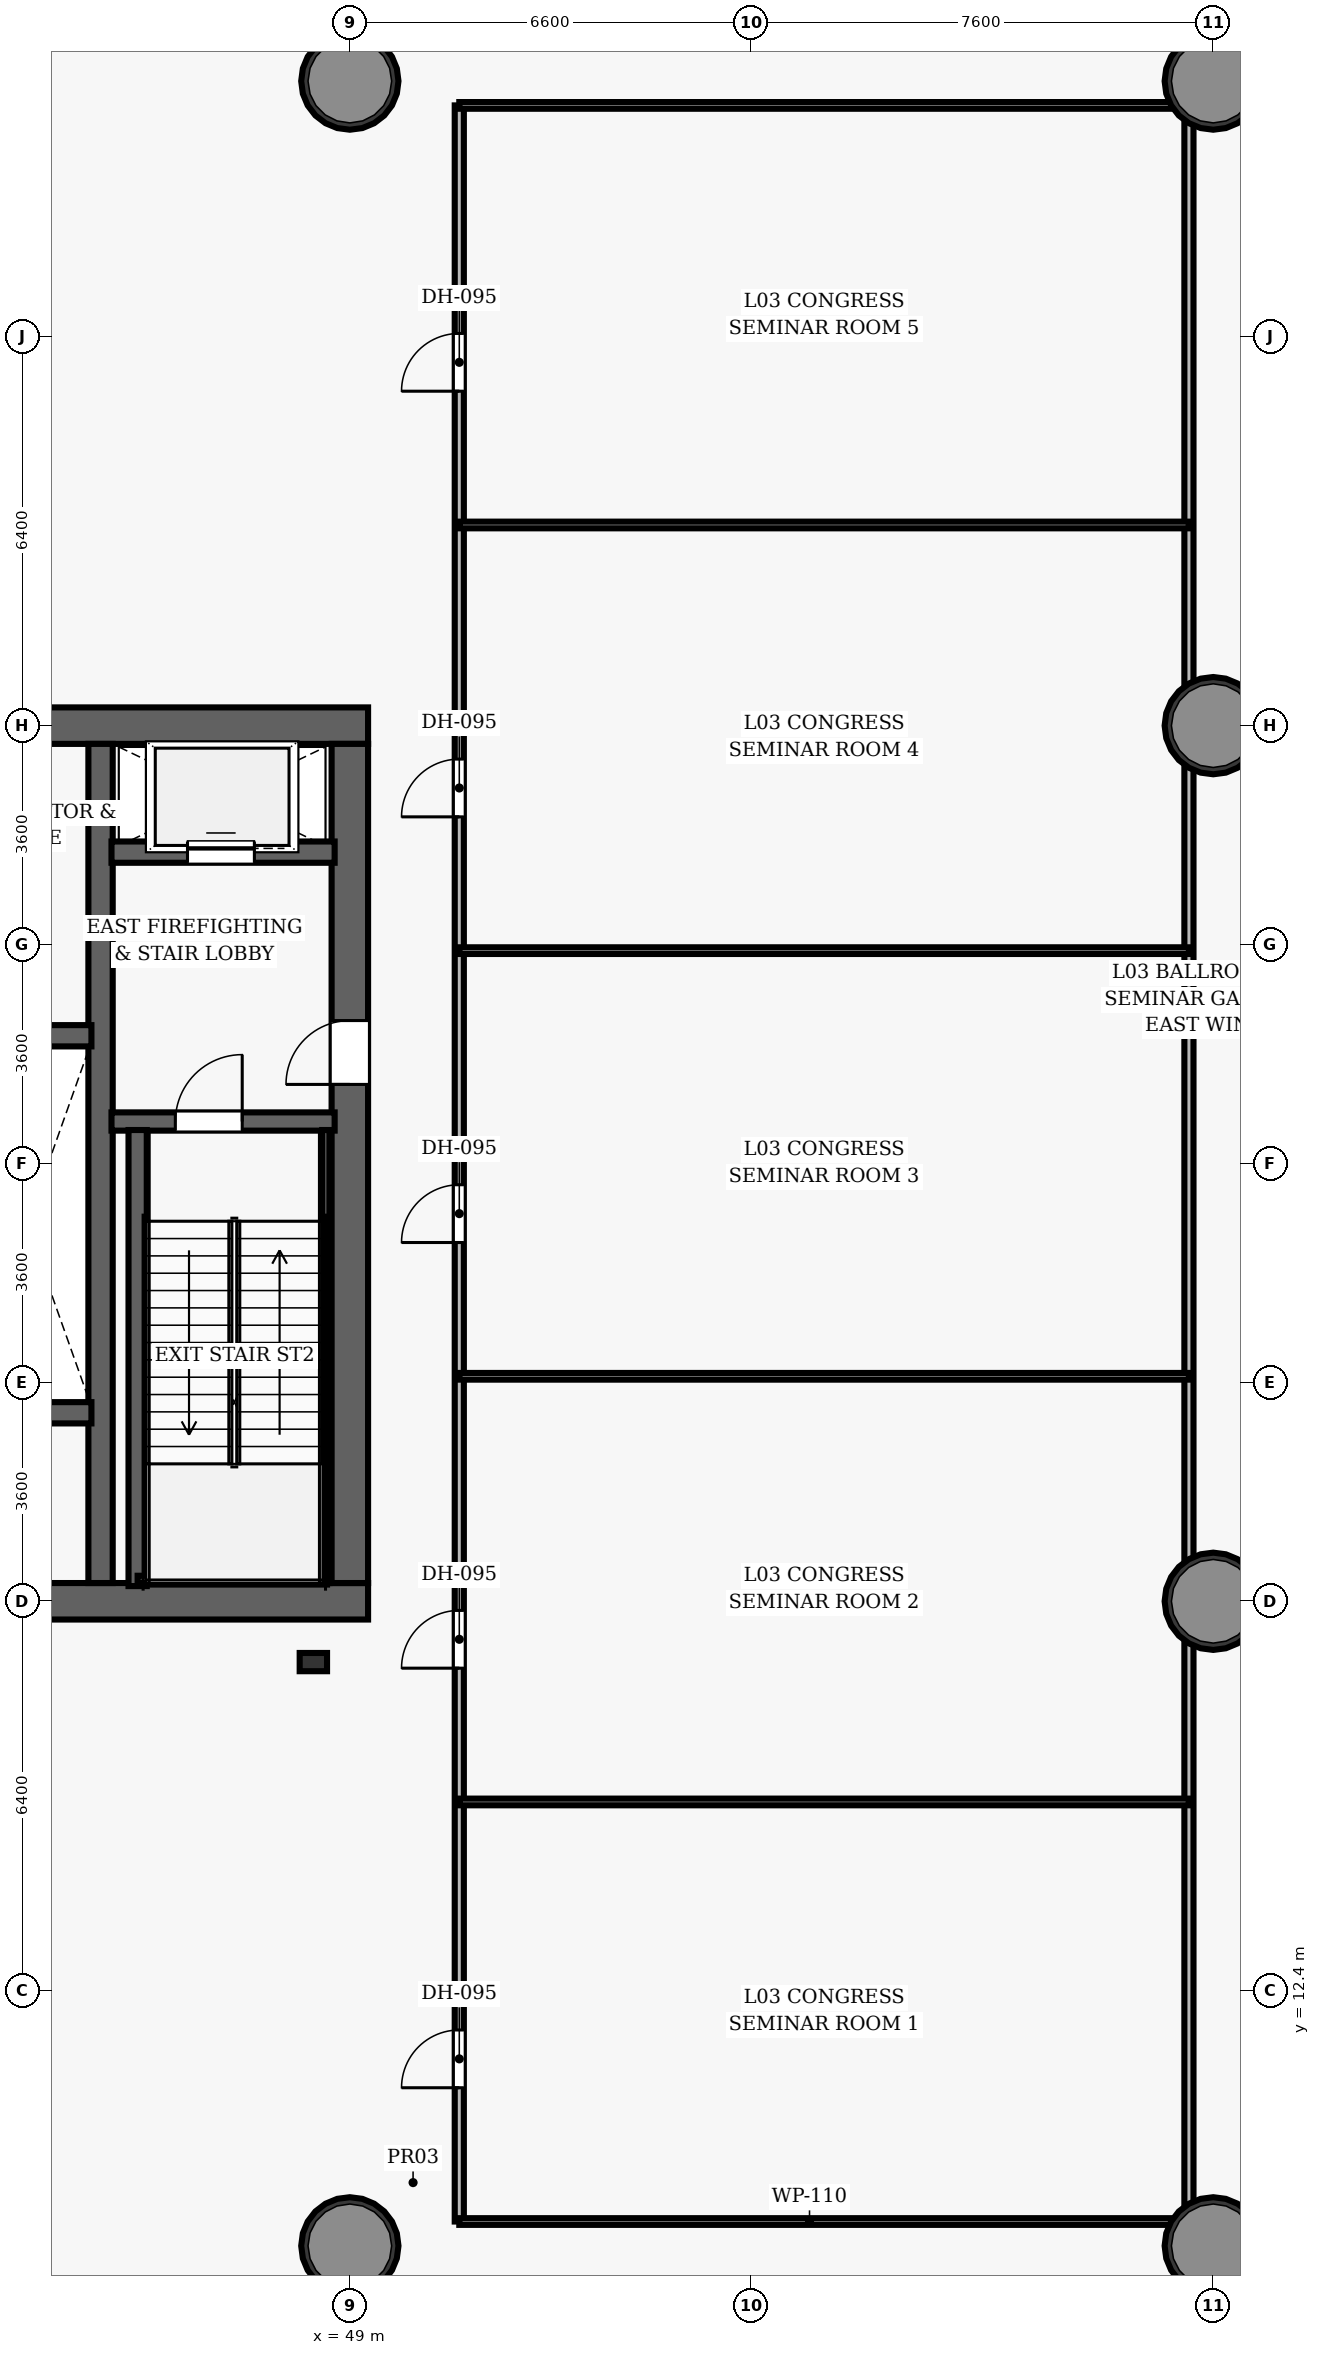
"""IFC4 building model, lengths in metres.
Left out: names, types, materials, properties, quantities, classifications, styles, units other than length and angle.
Written with IfcOpenShell. Run it as: python <this file> out.ifc"""

import sys

from ifc_helpers import new_model, si_unit, direction, frame, frame_2d, origin, origin_2d, place, context, subcontext, project, spatial, rectangle, hollow_circle, extrude, element, fill, save


model = new_model("IFC4")
c1 = context("Model", 3, precision=1e-05, world=origin(), true_north=direction((0.0, 1.0)))
c2 = subcontext(c1, "Body", "Model", "MODEL_VIEW")
j1 = project(units=[si_unit("LENGTHUNIT", "METRE"), si_unit("PLANEANGLEUNIT", "RADIAN")], contexts=[c1])
p1 = place(None, origin())
s1 = spatial("IfcSite", under=j1, at=p1, CompositionType="ELEMENT")
p2 = place(p1, origin())
s2 = spatial("IfcBuilding", under=s1, at=p2, CompositionType="ELEMENT")
p3 = place(p2, frame((0.0, 0.0, 18.6)))
s3 = spatial("IfcBuildingStorey", under=s2, at=p3, CompositionType="ELEMENT", Elevation=18.6)
p4 = place(p3, frame((26.7, 18.8, 0.0), z_axis=(0.0, 0.0, 1.0), x_axis=(1.0, 0.0, 0.0)))
e1 = element("IfcWall", 1, at=p4, inside=s3, PredefinedType="SHEAR", context=c2, shape_type="SweptSolid", body=[
    extrude(rectangle(XDim=22.6, YDim=0.6, at=frame_2d((11.3, 0.0))), origin(), (0.0, 0.0, 1.0), 5.4),
])
p5 = place(p4, frame((14.52, 0.0, 0.0)))
e2 = element("IfcOpeningElement", 2, at=p5, cuts=e1, PredefinedType="OPENING", context=c2, shape_type="SweptSolid", body=[
    extrude(rectangle(XDim=1.05, YDim=2.15, at=frame_2d((0.525, 1.075))), frame((0.0, 0.31, 0.0), z_axis=(0.0, -1.0, 0.0), x_axis=(1.0, 0.0, 0.0)), (0.0, 0.0, 1.0), 0.62),
])
p6 = place(p3, frame((26.7, 33.2, 0.0), z_axis=(0.0, 0.0, 1.0), x_axis=(1.0, 0.0, 0.0)))
e3 = element("IfcWall", 3, at=p6, inside=s3, PredefinedType="SHEAR", context=c2, shape_type="SweptSolid", body=[
    extrude(rectangle(XDim=22.6, YDim=0.6, at=frame_2d((11.3, 0.0))), origin(), (0.0, 0.0, 1.0), 5.4),
])
p7 = place(p6, frame((4.62, 0.0, 0.0)))
e4 = element("IfcOpeningElement", 4, at=p7, cuts=e3, PredefinedType="OPENING", context=c2, shape_type="SweptSolid", body=[
    extrude(rectangle(XDim=1.05, YDim=2.15, at=frame_2d((0.525, 1.075))), frame((0.0, 0.31, 0.0), z_axis=(0.0, -1.0, 0.0), x_axis=(1.0, 0.0, 0.0)), (0.0, 0.0, 1.0), 0.62),
])
p8 = place(p6, frame((14.52, 0.0, 0.0)))
e5 = element("IfcOpeningElement", 5, at=p8, cuts=e3, PredefinedType="OPENING", context=c2, shape_type="SweptSolid", body=[
    extrude(rectangle(XDim=1.05, YDim=2.15, at=frame_2d((0.525, 1.075))), frame((0.0, 0.31, 0.0), z_axis=(0.0, -1.0, 0.0), x_axis=(1.0, 0.0, 0.0)), (0.0, 0.0, 1.0), 0.62),
])
p9 = place(p3, frame((49.0, 19.1, 0.0), z_axis=(0.0, 0.0, 1.0), x_axis=(0.0, 1.0, 0.0)))
e6 = element("IfcWall", 6, at=p9, inside=s3, PredefinedType="SHEAR", context=c2, shape_type="SweptSolid", body=[
    extrude(rectangle(XDim=13.8, YDim=0.6, at=frame_2d((6.9, 0.0))), origin(), (0.0, 0.0, 1.0), 5.4),
])
p10 = place(p9, frame((8.2, 0.0, 0.0)))
e7 = element("IfcOpeningElement", 7, at=p10, cuts=e6, PredefinedType="OPENING", context=c2, shape_type="SweptSolid", body=[
    extrude(rectangle(XDim=1.05, YDim=2.15, at=frame_2d((0.525, 1.075))), frame((0.0, 0.31, 0.0), z_axis=(0.0, -1.0, 0.0), x_axis=(1.0, 0.0, 0.0)), (0.0, 0.0, 1.0), 0.62),
])
p11 = place(p3, frame((44.9, 19.1, 0.0), z_axis=(0.0, 0.0, 1.0), x_axis=(0.0, 1.0, 0.0)))
e8 = element("IfcWall", 8, at=p11, inside=s3, PredefinedType="SHEAR", context=c2, shape_type="SweptSolid", body=[
    extrude(rectangle(XDim=13.8, YDim=0.4, at=frame_2d((6.9, 0.0))), origin(), (0.0, 0.0, 1.0), 5.4),
])
for number, where, z_axis, x_axis in (
    (9, (49.0, 8.2, 0.0), (0.0, 0.0, 1.0), (1.0, 0.0, 0.0)),
    (10, (63.2, 8.2, 0.0), (0.0, 0.0, 1.0), (1.0, 0.0, 0.0)),
    (11, (63.2, 18.8, 0.0), (0.0, 0.0, 1.0), (1.0, 0.0, 0.0)),
    (12, (63.2, 33.2, 0.0), (0.0, 0.0, 1.0), (1.0, 0.0, 0.0)),
    (13, (49.0, 43.8, 0.0), (0.0, 0.0, 1.0), (1.0, 0.0, 0.0)),
    (14, (63.2, 43.8, 0.0), (0.0, 0.0, 1.0), (1.0, 0.0, 0.0)),
):
    element("IfcColumn", number, at=place(p3, frame(where, z_axis=z_axis, x_axis=x_axis)), inside=s3, PredefinedType="COLUMN", context=c2, shape_type="SweptSolid", body=[
        extrude(hollow_circle(Radius=0.8, WallThickness=0.06, at=origin_2d()), origin(), (0.0, 0.0, 1.0), 5.4),
    ])
p12 = place(p3, frame((45.08, 26.69, 0.0), z_axis=(0.0, 0.0, 1.0), x_axis=(1.0, 0.0, 0.0)))
e15 = element("IfcWall", 15, at=p12, inside=s3, PredefinedType="SHEAR", context=c2, shape_type="SweptSolid", body=[
    extrude(rectangle(XDim=3.67, YDim=0.3, at=frame_2d((1.835, 0.0))), origin(), (0.0, 0.0, 1.0), 5.4),
])
p13 = place(p12, frame((1.05, 0.0, 0.0)))
e16 = element("IfcOpeningElement", 16, at=p13, cuts=e15, PredefinedType="OPENING", context=c2, shape_type="SweptSolid", body=[
    extrude(rectangle(XDim=1.1, YDim=2.15, at=frame_2d((0.55, 1.075))), frame((0.0, 0.16, 0.0), z_axis=(0.0, -1.0, 0.0), x_axis=(1.0, 0.0, 0.0)), (0.0, 0.0, 1.0), 0.32),
])
p14 = place(p3, frame((45.51, 19.05, 0.0), z_axis=(0.0, 0.0, 1.0), x_axis=(0.0, 1.0, 0.0)))
e17 = element("IfcWall", 17, at=p14, inside=s3, PredefinedType="SHEAR", context=c2, shape_type="SweptSolid", body=[
    extrude(rectangle(XDim=7.5, YDim=0.3, at=frame_2d((3.75, 0.0))), origin(), (0.0, 0.0, 1.0), 5.4),
])
p15 = place(p3, frame((48.605, 19.1, 0.0), z_axis=(0.0, 0.0, 1.0), x_axis=(0.0, 1.0, 0.0)))
e18 = element("IfcWall", 18, at=p15, inside=s3, PredefinedType="SHEAR", context=c2, shape_type="SweptSolid", body=[
    extrude(rectangle(XDim=7.45, YDim=0.12, at=frame_2d((3.725, 0.0))), origin(), (0.0, 0.0, 1.0), 5.4),
])
p16 = place(p3, frame((45.51, 19.16, 0.0), z_axis=(0.0, 0.0, 1.0), x_axis=(1.0, 0.0, 0.0)))
e19 = element("IfcWall", 19, at=p16, inside=s3, PredefinedType="SHEAR", context=c2, shape_type="SweptSolid", body=[
    extrude(rectangle(XDim=3.095, YDim=0.12, at=frame_2d((1.547, 0.0))), origin(), (0.0, 0.0, 1.0), 5.4),
])
p17 = place(p3, frame((45.08, 31.12, 0.0), z_axis=(0.0, 0.0, 1.0), x_axis=(1.0, 0.0, 0.0)))
e20 = element("IfcWall", 20, at=p17, inside=s3, PredefinedType="SHEAR", context=c2, shape_type="SweptSolid", body=[
    extrude(rectangle(XDim=3.67, YDim=0.35, at=frame_2d((1.835, 0.0))), origin(), (0.0, 0.0, 1.0), 4.11),
])
p18 = place(p17, frame((1.25, 0.0, 0.0)))
e21 = element("IfcOpeningElement", 21, at=p18, cuts=e20, PredefinedType="OPENING", context=c2, shape_type="SweptSolid", body=[
    extrude(rectangle(XDim=1.1, YDim=2.15, at=frame_2d((0.55, 1.075))), frame((0.0, 0.185, 0.0), z_axis=(0.0, -1.0, 0.0), x_axis=(1.0, 0.0, 0.0)), (0.0, 0.0, 1.0), 0.37),
])
for number, where, z_axis, x_axis in (
    (22, (42.72, 21.9, 0.0), (0.0, 0.0, 1.0), (1.0, 0.0, 0.0)),
    (23, (42.72, 28.1, 0.0), (0.0, 0.0, 1.0), (1.0, 0.0, 0.0)),
):
    element("IfcWall", number, at=place(p3, frame(where, z_axis=z_axis, x_axis=x_axis)), inside=s3, PredefinedType="SHEAR", context=c2, shape_type="SweptSolid", body=[
        extrude(rectangle(XDim=2.03, YDim=0.35, at=frame_2d((1.015, 0.0))), origin(), (0.0, 0.0, 1.0), 4.11),
    ])
p19 = place(p3, frame((48.4, 17.8, 0.0), z_axis=(0.0, 0.0, 1.0), x_axis=(1.0, 0.0, 0.0)))
e24 = element("IfcColumn", 24, at=p19, inside=s3, PredefinedType="PILASTER", context=c2, shape_type="SweptSolid", body=[
    extrude(rectangle(XDim=0.45, YDim=0.3, at=origin_2d()), origin(), (0.0, 0.0, 1.0), 5.4),
])
p20 = place(p3, frame((50.8, 8.6, 0.0), z_axis=(0.0, 0.0, 1.0), x_axis=(0.0, 1.0, 0.0)))
e25 = element("IfcWall", 25, at=p20, inside=s3, PredefinedType="PARTITIONING", context=c2, shape_type="SweptSolid", body=[
    extrude(rectangle(XDim=34.8, YDim=0.15, at=frame_2d((17.4, 0.0))), origin(), (0.0, 0.0, 1.0), 4.11),
])
p21 = place(p20, frame((2.2, 0.0, 0.0)))
e26 = element("IfcOpeningElement", 26, at=p21, cuts=e25, PredefinedType="OPENING", context=c2, shape_type="SweptSolid", body=[
    extrude(rectangle(XDim=0.95, YDim=2.15, at=frame_2d((0.475, 1.075))), frame((0.0, 0.085, 0.0), z_axis=(0.0, -1.0, 0.0), x_axis=(1.0, 0.0, 0.0)), (0.0, 0.0, 1.0), 0.17),
])
p22 = place(p20, frame((9.1, 0.0, 0.0)))
e27 = element("IfcOpeningElement", 27, at=p22, cuts=e25, PredefinedType="OPENING", context=c2, shape_type="SweptSolid", body=[
    extrude(rectangle(XDim=0.95, YDim=2.15, at=frame_2d((0.475, 1.075))), frame((0.0, 0.085, 0.0), z_axis=(0.0, -1.0, 0.0), x_axis=(1.0, 0.0, 0.0)), (0.0, 0.0, 1.0), 0.17),
])
p23 = place(p20, frame((16.1, 0.0, 0.0)))
e28 = element("IfcOpeningElement", 28, at=p23, cuts=e25, PredefinedType="OPENING", context=c2, shape_type="SweptSolid", body=[
    extrude(rectangle(XDim=0.95, YDim=2.15, at=frame_2d((0.475, 1.075))), frame((0.0, 0.085, 0.0), z_axis=(0.0, -1.0, 0.0), x_axis=(1.0, 0.0, 0.0)), (0.0, 0.0, 1.0), 0.17),
])
p24 = place(p20, frame((23.1, 0.0, 0.0)))
e29 = element("IfcOpeningElement", 29, at=p24, cuts=e25, PredefinedType="OPENING", context=c2, shape_type="SweptSolid", body=[
    extrude(rectangle(XDim=0.95, YDim=2.15, at=frame_2d((0.475, 1.075))), frame((0.0, 0.085, 0.0), z_axis=(0.0, -1.0, 0.0), x_axis=(1.0, 0.0, 0.0)), (0.0, 0.0, 1.0), 0.17),
])
p25 = place(p20, frame((30.1, 0.0, 0.0)))
e30 = element("IfcOpeningElement", 30, at=p25, cuts=e25, PredefinedType="OPENING", context=c2, shape_type="SweptSolid", body=[
    extrude(rectangle(XDim=0.95, YDim=2.15, at=frame_2d((0.475, 1.075))), frame((0.0, 0.085, 0.0), z_axis=(0.0, -1.0, 0.0), x_axis=(1.0, 0.0, 0.0)), (0.0, 0.0, 1.0), 0.17),
])
p26 = place(p3, frame((62.8, 8.6, 0.0), z_axis=(0.0, 0.0, 1.0), x_axis=(0.0, 1.0, 0.0)))
e31 = element("IfcWall", 31, at=p26, inside=s3, PredefinedType="PARTITIONING", context=c2, shape_type="SweptSolid", body=[
    extrude(rectangle(XDim=34.8, YDim=0.15, at=frame_2d((17.4, 0.0))), origin(), (0.0, 0.0, 1.0), 4.11),
])
for number, where, z_axis, x_axis in (
    (32, (50.8, 8.6, 0.0), (0.0, 0.0, 1.0), (1.0, 0.0, 0.0)),
    (33, (50.8, 15.5, 0.0), (0.0, 0.0, 1.0), (1.0, 0.0, 0.0)),
    (34, (50.8, 22.5, 0.0), (0.0, 0.0, 1.0), (1.0, 0.0, 0.0)),
    (35, (50.8, 29.5, 0.0), (0.0, 0.0, 1.0), (1.0, 0.0, 0.0)),
    (36, (50.8, 36.5, 0.0), (0.0, 0.0, 1.0), (1.0, 0.0, 0.0)),
    (37, (50.8, 43.4, 0.0), (0.0, 0.0, 1.0), (1.0, 0.0, 0.0)),
):
    element("IfcWall", number, at=place(p3, frame(where, z_axis=z_axis, x_axis=x_axis)), inside=s3, PredefinedType="PARTITIONING", context=c2, shape_type="SweptSolid", body=[
        extrude(rectangle(XDim=12.0, YDim=0.11, at=frame_2d((6.0, 0.0))), origin(), (0.0, 0.0, 1.0), 4.11),
    ])
p27 = place(p13, origin())
e38 = element("IfcDoor", 38, at=p27, inside=s3, OperationType="SINGLE_SWING_RIGHT", PredefinedType="DOOR", context=c2, shape_type="SweptSolid", body=[
    extrude(rectangle(XDim=1.1, YDim=2.15, at=frame_2d((0.55, 1.075))), frame((0.0, 0.025, 0.0), z_axis=(0.0, -1.0, 0.0), x_axis=(1.0, 0.0, 0.0)), (0.0, 0.0, 1.0), 0.05),
])
fill(e16, e38)
p28 = place(p10, origin())
e39 = element("IfcDoor", 39, at=p28, inside=s3, OperationType="SINGLE_SWING_LEFT", PredefinedType="DOOR", context=c2, shape_type="SweptSolid", body=[
    extrude(rectangle(XDim=1.05, YDim=2.15, at=frame_2d((0.525, 1.075))), frame((0.0, 0.025, 0.0), z_axis=(0.0, -1.0, 0.0), x_axis=(1.0, 0.0, 0.0)), (0.0, 0.0, 1.0), 0.05),
])
fill(e7, e39)
p29 = place(p21, origin())
e40 = element("IfcDoor", 40, at=p29, inside=s3, OperationType="SINGLE_SWING_LEFT", PredefinedType="DOOR", context=c2, shape_type="SweptSolid", body=[
    extrude(rectangle(XDim=0.95, YDim=2.15, at=frame_2d((0.475, 1.075))), frame((0.0, 0.025, 0.0), z_axis=(0.0, -1.0, 0.0), x_axis=(1.0, 0.0, 0.0)), (0.0, 0.0, 1.0), 0.05),
])
fill(e26, e40)
p30 = place(p22, origin())
e41 = element("IfcDoor", 41, at=p30, inside=s3, OperationType="SINGLE_SWING_LEFT", PredefinedType="DOOR", context=c2, shape_type="SweptSolid", body=[
    extrude(rectangle(XDim=0.95, YDim=2.15, at=frame_2d((0.475, 1.075))), frame((0.0, 0.025, 0.0), z_axis=(0.0, -1.0, 0.0), x_axis=(1.0, 0.0, 0.0)), (0.0, 0.0, 1.0), 0.05),
])
fill(e27, e41)
p31 = place(p23, origin())
e42 = element("IfcDoor", 42, at=p31, inside=s3, OperationType="SINGLE_SWING_LEFT", PredefinedType="DOOR", context=c2, shape_type="SweptSolid", body=[
    extrude(rectangle(XDim=0.95, YDim=2.15, at=frame_2d((0.475, 1.075))), frame((0.0, 0.025, 0.0), z_axis=(0.0, -1.0, 0.0), x_axis=(1.0, 0.0, 0.0)), (0.0, 0.0, 1.0), 0.05),
])
fill(e28, e42)
p32 = place(p24, origin())
e43 = element("IfcDoor", 43, at=p32, inside=s3, OperationType="SINGLE_SWING_LEFT", PredefinedType="DOOR", context=c2, shape_type="SweptSolid", body=[
    extrude(rectangle(XDim=0.95, YDim=2.15, at=frame_2d((0.475, 1.075))), frame((0.0, 0.025, 0.0), z_axis=(0.0, -1.0, 0.0), x_axis=(1.0, 0.0, 0.0)), (0.0, 0.0, 1.0), 0.05),
])
fill(e29, e43)
p33 = place(p25, origin())
e44 = element("IfcDoor", 44, at=p33, inside=s3, OperationType="SINGLE_SWING_LEFT", PredefinedType="DOOR", context=c2, shape_type="SweptSolid", body=[
    extrude(rectangle(XDim=0.95, YDim=2.15, at=frame_2d((0.475, 1.075))), frame((0.0, 0.025, 0.0), z_axis=(0.0, -1.0, 0.0), x_axis=(1.0, 0.0, 0.0)), (0.0, 0.0, 1.0), 0.05),
])
fill(e30, e44)
p34 = place(p18, origin())
e45 = element("IfcDoor", 45, at=p34, inside=s3, OperationType="SLIDING_TO_LEFT", PredefinedType="DOOR", context=c2, shape_type="SweptSolid", body=[
    extrude(rectangle(XDim=1.1, YDim=2.15, at=frame_2d((0.55, 1.075))), frame((0.0, 0.025, 0.0), z_axis=(0.0, -1.0, 0.0), x_axis=(1.0, 0.0, 0.0)), (0.0, 0.0, 1.0), 0.05),
])
fill(e21, e45)
save(model, sys.argv[1])
